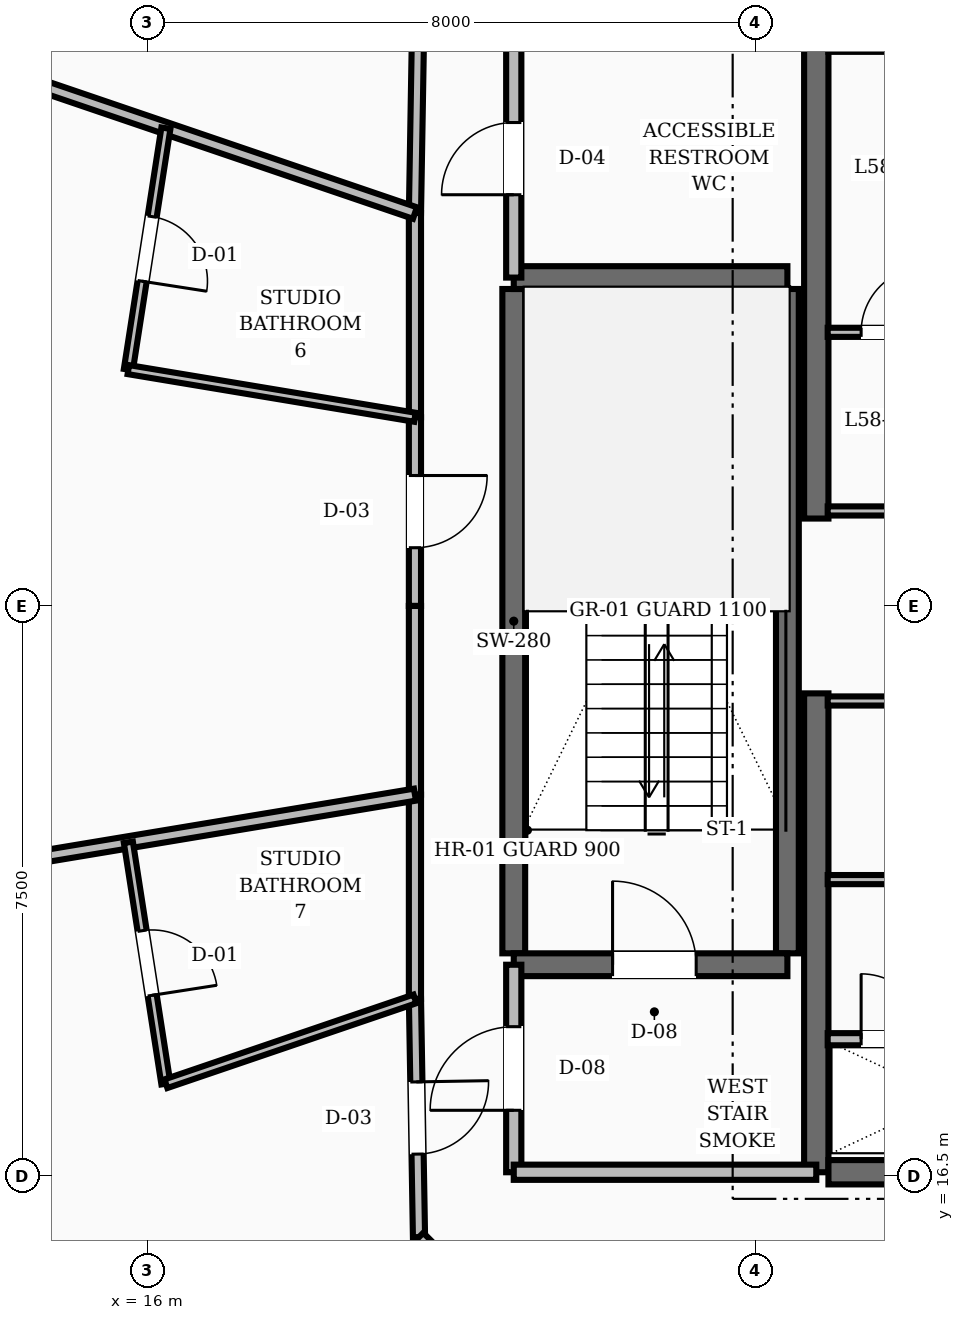
"""IFC4 building model, lengths in metres.
Left out: names, types, materials, properties, quantities, classifications, styles, units other than length and angle.
Written with IfcOpenShell. Run it as: python <this file> out.ifc"""

import sys

from ifc_helpers import new_model, si_unit, direction, frame, frame_2d, origin, place, context, subcontext, project, spatial, rectangle, extrude, element, fill, save


model = new_model("IFC4")
c1 = context("Model", 3, precision=1e-05, world=origin(), true_north=direction((0.0, 1.0)))
c2 = subcontext(c1, "Body", "Model", "MODEL_VIEW")
j1 = project(units=[si_unit("LENGTHUNIT", "METRE"), si_unit("PLANEANGLEUNIT", "RADIAN")], contexts=[c1])
p1 = place(None, origin())
s1 = spatial("IfcSite", under=j1, at=p1, CompositionType="ELEMENT")
p2 = place(p1, origin())
s2 = spatial("IfcBuilding", under=s1, at=p2, CompositionType="ELEMENT")
p3 = place(p2, frame((0.0, 0.0, 225.6)))
s3 = spatial("IfcBuildingStorey", under=s2, at=p3, CompositionType="ELEMENT", Elevation=225.6)
for number, where, z_axis, x_axis in (
    (1, (24.8, 16.55, 0.0), (0.0, 0.0, 1.0), (0.0, 1.0, 0.0)),
    (2, (24.8, 25.15, 0.0), (0.0, 0.0, 1.0), (0.0, 1.0, 0.0)),
):
    element("IfcWall", number, at=place(p3, frame(where, z_axis=z_axis, x_axis=x_axis)), inside=s3, PredefinedType="SHEAR", context=c2, shape_type="SweptSolid", body=[
        extrude(rectangle(XDim=6.3, YDim=0.32, at=frame_2d((3.15, 0.0))), origin(), (0.0, 0.0, 1.0), 3.6),
    ])
p4 = place(p3, frame((24.96, 16.55, 0.0), z_axis=(0.0, 0.0, 1.0), x_axis=(1.0, 0.0, 0.0)))
e3 = element("IfcWall", 3, at=p4, inside=s3, PredefinedType="SHEAR", context=c2, shape_type="SweptSolid", body=[
    extrude(rectangle(XDim=3.24, YDim=0.32, at=frame_2d((1.62, 0.0))), origin(), (0.0, 0.0, 1.0), 3.6),
])
for number, where, z_axis, x_axis in (
    (4, (20.82, 19.43, 0.0), (0.0, 0.0, 1.0), (0.0, 1.0, 0.0)),
    (5, (24.42, 19.43, 0.0), (0.0, 0.0, 1.0), (0.0, 1.0, 0.0)),
):
    element("IfcWall", number, at=place(p3, frame(where, z_axis=z_axis, x_axis=x_axis)), inside=s3, PredefinedType="SHEAR", context=c2, shape_type="SweptSolid", body=[
        extrude(rectangle(XDim=8.74, YDim=0.3, at=frame_2d((4.37, 0.0))), origin(), (0.0, 0.0, 1.0), 3.6),
    ])
p5 = place(p3, frame((20.82, 19.28, 0.0), z_axis=(0.0, 0.0, 1.0), x_axis=(1.0, 0.0, 0.0)))
e6 = element("IfcWall", 6, at=p5, inside=s3, PredefinedType="SHEAR", context=c2, shape_type="SweptSolid", body=[
    extrude(rectangle(XDim=3.6, YDim=0.3, at=frame_2d((1.8, 0.0))), origin(), (0.0, 0.0, 1.0), 3.6),
])
p6 = place(p5, frame((1.3, 0.0, 0.0)))
e7 = element("IfcOpeningElement", 7, at=p6, cuts=e6, PredefinedType="OPENING", context=c2, shape_type="SweptSolid", body=[
    extrude(rectangle(XDim=1.1, YDim=2.1, at=frame_2d((0.55, 1.05))), frame((0.0, 0.16, 0.0), z_axis=(0.0, -1.0, 0.0), x_axis=(1.0, 0.0, 0.0)), (0.0, 0.0, 1.0), 0.32),
])
p7 = place(p3, frame((20.82, 28.32, 0.0), z_axis=(0.0, 0.0, 1.0), x_axis=(1.0, 0.0, 0.0)))
e8 = element("IfcWall", 8, at=p7, inside=s3, PredefinedType="SHEAR", context=c2, shape_type="SweptSolid", body=[
    extrude(rectangle(XDim=3.6, YDim=0.3, at=frame_2d((1.8, 0.0))), origin(), (0.0, 0.0, 1.0), 3.6),
])
p8 = place(p3, frame((20.82, 16.55, 0.0), z_axis=(0.0, 0.0, 1.0), x_axis=(0.0, 1.0, 0.0)))
e9 = element("IfcWall", 9, at=p8, inside=s3, PredefinedType="SOLIDWALL", context=c2, shape_type="SweptSolid", body=[
    extrude(rectangle(XDim=2.73, YDim=0.2, at=frame_2d((1.365, 0.0))), origin(), (0.0, 0.0, 1.0), 2.87),
])
p9 = place(p8, frame((0.815, 0.0, 0.0)))
e10 = element("IfcOpeningElement", 10, at=p9, cuts=e9, PredefinedType="OPENING", context=c2, shape_type="SweptSolid", body=[
    extrude(rectangle(XDim=1.1, YDim=2.1, at=frame_2d((0.55, 1.05))), frame((0.0, 0.11, 0.0), z_axis=(0.0, -1.0, 0.0), x_axis=(1.0, 0.0, 0.0)), (0.0, 0.0, 1.0), 0.22),
])
p10 = place(p3, frame((20.82, 16.55, 0.0), z_axis=(0.0, 0.0, 1.0), x_axis=(1.0, 0.0, 0.0)))
e11 = element("IfcWall", 11, at=p10, inside=s3, PredefinedType="SOLIDWALL", context=c2, shape_type="SweptSolid", body=[
    extrude(rectangle(XDim=3.98, YDim=0.2, at=frame_2d((1.99, 0.0))), origin(), (0.0, 0.0, 1.0), 2.87),
])
p11 = place(p3, frame((20.82, 28.32, 0.0), z_axis=(0.0, 0.0, 1.0), x_axis=(0.0, 1.0, 0.0)))
e12 = element("IfcWall", 12, at=p11, inside=s3, PredefinedType="SOLIDWALL", context=c2, shape_type="SweptSolid", body=[
    extrude(rectangle(XDim=3.13, YDim=0.2, at=frame_2d((1.565, 0.0))), origin(), (0.0, 0.0, 1.0), 2.87),
])
p12 = place(p11, frame((1.09, 0.0, 0.0)))
e13 = element("IfcOpeningElement", 13, at=p12, cuts=e12, PredefinedType="OPENING", context=c2, shape_type="SweptSolid", body=[
    extrude(rectangle(XDim=0.95, YDim=2.1, at=frame_2d((0.475, 1.05))), frame((0.0, 0.11, 0.0), z_axis=(0.0, -1.0, 0.0), x_axis=(1.0, 0.0, 0.0)), (0.0, 0.0, 1.0), 0.22),
])
p13 = place(p3, frame((24.95, 18.3, 0.0), z_axis=(0.0, 0.0, 1.0), x_axis=(1.0, 0.0, 0.0)))
e14 = element("IfcWall", 14, at=p13, inside=s3, PredefinedType="SOLIDWALL", context=c2, shape_type="SweptSolid", body=[
    extrude(rectangle(XDim=3.2, YDim=0.16, at=frame_2d((1.6, 0.0))), origin(), (0.0, 0.0, 1.0), 2.87),
])
p14 = place(p13, frame((0.44, 0.0, 0.0)))
e15 = element("IfcOpeningElement", 15, at=p14, cuts=e14, PredefinedType="OPENING", context=c2, shape_type="SweptSolid", body=[
    extrude(rectangle(XDim=0.86, YDim=2.05, at=frame_2d((0.43, 1.025))), frame((0.0, 0.09, 0.0), z_axis=(0.0, -1.0, 0.0), x_axis=(1.0, 0.0, 0.0)), (0.0, 0.0, 1.0), 0.18),
])
p15 = place(p3, frame((24.95, 25.25, 0.0), z_axis=(0.0, 0.0, 1.0), x_axis=(1.0, 0.0, 0.0)))
e16 = element("IfcWall", 16, at=p15, inside=s3, PredefinedType="PARTITIONING", context=c2, shape_type="SweptSolid", body=[
    extrude(rectangle(XDim=3.2, YDim=0.12, at=frame_2d((1.6, 0.0))), origin(), (0.0, 0.0, 1.0), 2.87),
])
p16 = place(p15, frame((1.125, 0.0, 0.0)))
e17 = element("IfcOpeningElement", 17, at=p16, cuts=e16, PredefinedType="OPENING", context=c2, shape_type="SweptSolid", body=[
    extrude(rectangle(XDim=0.95, YDim=2.1, at=frame_2d((0.475, 1.05))), frame((0.0, 0.07, 0.0), z_axis=(0.0, -1.0, 0.0), x_axis=(1.0, 0.0, 0.0)), (0.0, 0.0, 1.0), 0.14),
])
p17 = place(p3, frame((24.95, 22.75, 0.0), z_axis=(0.0, 0.0, 1.0), x_axis=(1.0, 0.0, 0.0)))
e18 = element("IfcWall", 18, at=p17, inside=s3, PredefinedType="PARTITIONING", context=c2, shape_type="SweptSolid", body=[
    extrude(rectangle(XDim=3.2, YDim=0.12, at=frame_2d((1.6, 0.0))), origin(), (0.0, 0.0, 1.0), 2.87),
])
p18 = place(p17, frame((1.125, 0.0, 0.0)))
e19 = element("IfcOpeningElement", 19, at=p18, cuts=e18, PredefinedType="OPENING", context=c2, shape_type="SweptSolid", body=[
    extrude(rectangle(XDim=0.95, YDim=2.1, at=frame_2d((0.475, 1.05))), frame((0.0, 0.07, 0.0), z_axis=(0.0, -1.0, 0.0), x_axis=(1.0, 0.0, 0.0)), (0.0, 0.0, 1.0), 0.14),
])
p19 = place(p3, frame((24.95, 27.6, 0.0), z_axis=(0.0, 0.0, 1.0), x_axis=(1.0, 0.0, 0.0)))
e20 = element("IfcWall", 20, at=p19, inside=s3, PredefinedType="PARTITIONING", context=c2, shape_type="SweptSolid", body=[
    extrude(rectangle(XDim=3.2, YDim=0.12, at=frame_2d((1.6, 0.0))), origin(), (0.0, 0.0, 1.0), 2.87),
])
p20 = place(p19, frame((0.44, 0.0, 0.0)))
e21 = element("IfcOpeningElement", 21, at=p20, cuts=e20, PredefinedType="OPENING", context=c2, shape_type="SweptSolid", body=[
    extrude(rectangle(XDim=0.86, YDim=2.1, at=frame_2d((0.43, 1.05))), frame((0.0, 0.07, 0.0), z_axis=(0.0, -1.0, 0.0), x_axis=(1.0, 0.0, 0.0)), (0.0, 0.0, 1.0), 0.14),
])
p21 = place(p19, frame((1.9, 0.0, 0.0)))
e22 = element("IfcOpeningElement", 22, at=p21, cuts=e20, PredefinedType="OPENING", context=c2, shape_type="SweptSolid", body=[
    extrude(rectangle(XDim=0.86, YDim=2.1, at=frame_2d((0.43, 1.05))), frame((0.0, 0.07, 0.0), z_axis=(0.0, -1.0, 0.0), x_axis=(1.0, 0.0, 0.0)), (0.0, 0.0, 1.0), 0.14),
])
p22 = place(p3, frame((24.95, 20.4, 0.0), z_axis=(0.0, 0.0, 1.0), x_axis=(1.0, 0.0, 0.0)))
e23 = element("IfcWall", 23, at=p22, inside=s3, PredefinedType="PARTITIONING", context=c2, shape_type="SweptSolid", body=[
    extrude(rectangle(XDim=3.2, YDim=0.12, at=frame_2d((1.6, 0.0))), origin(), (0.0, 0.0, 1.0), 2.87),
])
p23 = place(p22, frame((1.125, 0.0, 0.0)))
e24 = element("IfcOpeningElement", 24, at=p23, cuts=e23, PredefinedType="OPENING", context=c2, shape_type="SweptSolid", body=[
    extrude(rectangle(XDim=0.95, YDim=2.1, at=frame_2d((0.475, 1.05))), frame((0.0, 0.07, 0.0), z_axis=(0.0, -1.0, 0.0), x_axis=(1.0, 0.0, 0.0)), (0.0, 0.0, 1.0), 0.14),
])
p24 = place(p3, frame((19.573, 32.303, 0.0), z_axis=(0.0, 0.0, 1.0), x_axis=(-0.016981035134, -0.999855811828, 0.0)))
e25 = element("IfcWall", 25, at=p24, inside=s3, PredefinedType="SOLIDWALL", context=c2, shape_type="SweptSolid", body=[
    extrude(rectangle(XDim=3.134, YDim=0.16, at=frame_2d((1.567, 0.0))), origin(), (0.0, 0.0, 1.0), 2.87),
])
p25 = place(p3, frame((19.52, 29.169, 0.0), z_axis=(0.0, 0.0, 1.0), x_axis=(0.0, -1.0, 0.0)))
e26 = element("IfcWall", 26, at=p25, inside=s3, PredefinedType="SOLIDWALL", context=c2, shape_type="SweptSolid", body=[
    extrude(rectangle(XDim=2.687, YDim=0.16, at=frame_2d((1.344, 0.0))), origin(), (0.0, 0.0, 1.0), 2.87),
])
p26 = place(p3, frame((19.52, 26.482, 0.0), z_axis=(0.0, 0.0, 1.0), x_axis=(0.0, -1.0, 0.0)))
e27 = element("IfcWall", 27, at=p26, inside=s3, PredefinedType="SOLIDWALL", context=c2, shape_type="SweptSolid", body=[
    extrude(rectangle(XDim=2.482, YDim=0.16, at=frame_2d((1.241, 0.0))), origin(), (0.0, 0.0, 1.0), 2.87),
])
p27 = place(p26, frame((0.766, 0.0, 0.0)))
e28 = element("IfcOpeningElement", 28, at=p27, cuts=e27, PredefinedType="OPENING", context=c2, shape_type="SweptSolid", body=[
    extrude(rectangle(XDim=0.95, YDim=2.1, at=frame_2d((0.475, 1.05))), frame((0.0, 0.09, 0.0), z_axis=(0.0, -1.0, 0.0), x_axis=(1.0, 0.0, 0.0)), (0.0, 0.0, 1.0), 0.18),
])
p28 = place(p3, frame((19.52, 24.0, 0.0), z_axis=(0.0, 0.0, 1.0), x_axis=(0.0, -1.0, 0.0)))
e29 = element("IfcWall", 29, at=p28, inside=s3, PredefinedType="SOLIDWALL", context=c2, shape_type="SweptSolid", body=[
    extrude(rectangle(XDim=2.482, YDim=0.16, at=frame_2d((1.241, 0.0))), origin(), (0.0, 0.0, 1.0), 2.87),
])
p29 = place(p3, frame((19.52, 21.518, 0.0), z_axis=(0.0, 0.0, 1.0), x_axis=(0.0, -1.0, 0.0)))
e30 = element("IfcWall", 30, at=p29, inside=s3, PredefinedType="SOLIDWALL", context=c2, shape_type="SweptSolid", body=[
    extrude(rectangle(XDim=2.687, YDim=0.16, at=frame_2d((1.344, 0.0))), origin(), (0.0, 0.0, 1.0), 2.87),
])
p30 = place(p3, frame((19.52, 18.831, 0.0), z_axis=(0.0, 0.0, 1.0), x_axis=(0.016981035134, -0.999855811828, 0.0)))
e31 = element("IfcWall", 31, at=p30, inside=s3, PredefinedType="SOLIDWALL", context=c2, shape_type="SweptSolid", body=[
    extrude(rectangle(XDim=3.134, YDim=0.16, at=frame_2d((1.567, 0.0))), origin(), (0.0, 0.0, 1.0), 2.87),
])
p31 = place(p30, frame((1.092, 0.0, 0.0)))
e32 = element("IfcOpeningElement", 32, at=p31, cuts=e31, PredefinedType="OPENING", context=c2, shape_type="SweptSolid", body=[
    extrude(rectangle(XDim=0.95, YDim=2.1, at=frame_2d((0.475, 1.05))), frame((0.0, 0.09, 0.0), z_axis=(0.0, -1.0, 0.0), x_axis=(1.0, 0.0, 0.0)), (0.0, 0.0, 1.0), 0.18),
])
p32 = place(p3, frame((19.573, 15.697, 0.0), z_axis=(0.0, 0.0, 1.0), x_axis=(0.707106781187, -0.707106781187, 0.0)))
e33 = element("IfcWall", 33, at=p32, inside=s3, PredefinedType="SOLIDWALL", context=c2, shape_type="SweptSolid", body=[
    extrude(rectangle(XDim=2.916, YDim=0.16, at=frame_2d((1.458, 0.0))), origin(), (0.0, 0.0, 1.0), 2.87),
])
p33 = place(p3, frame((19.52, 29.169, 0.0), z_axis=(0.0, 0.0, 1.0), x_axis=(-0.946595836361, 0.322422583862, 0.0)))
e34 = element("IfcWall", 34, at=p33, inside=s3, PredefinedType="SOLIDWALL", context=c2, shape_type="SweptSolid", body=[
    extrude(rectangle(XDim=9.058, YDim=0.16, at=frame_2d((4.529, 0.0))), origin(), (0.0, 0.0, 1.0), 2.87),
])
p34 = place(p3, frame((16.244, 30.285, 0.0), z_axis=(0.0, 0.0, 1.0), x_axis=(-0.153660860634, -0.988123646063, 0.0)))
e35 = element("IfcWall", 35, at=p34, inside=s3, PredefinedType="PARTITIONING", context=c2, shape_type="SweptSolid", body=[
    extrude(rectangle(XDim=3.214, YDim=0.12, at=frame_2d((1.607, 0.0))), origin(), (0.0, 0.0, 1.0), 2.87),
])
p35 = place(p34, frame((1.177, 0.0, 0.0)))
e36 = element("IfcOpeningElement", 36, at=p35, cuts=e35, PredefinedType="OPENING", context=c2, shape_type="SweptSolid", body=[
    extrude(rectangle(XDim=0.86, YDim=2.1, at=frame_2d((0.43, 1.05))), frame((0.0, 0.07, 0.0), z_axis=(0.0, -1.0, 0.0), x_axis=(1.0, 0.0, 0.0)), (0.0, 0.0, 1.0), 0.14),
])
p36 = place(p3, frame((19.52, 26.482, 0.0), z_axis=(0.0, 0.0, 1.0), x_axis=(-0.986454281504, 0.164036430415, 0.0)))
e37 = element("IfcWall", 37, at=p36, inside=s3, PredefinedType="PARTITIONING", context=c2, shape_type="SweptSolid", body=[
    extrude(rectangle(XDim=3.822, YDim=0.12, at=frame_2d((1.911, 0.0))), origin(), (0.0, 0.0, 1.0), 2.87),
])
p37 = place(p3, frame((19.52, 21.518, 0.0), z_axis=(0.0, 0.0, 1.0), x_axis=(-0.986451224461, -0.164054813277, 0.0)))
e38 = element("IfcWall", 38, at=p37, inside=s3, PredefinedType="SOLIDWALL", context=c2, shape_type="SweptSolid", body=[
    extrude(rectangle(XDim=10.008, YDim=0.16, at=frame_2d((5.004, 0.0))), origin(), (0.0, 0.0, 1.0), 2.87),
])
p38 = place(p3, frame((15.75, 20.891, 0.0), z_axis=(0.0, 0.0, 1.0), x_axis=(0.153660860634, -0.988123646063, 0.0)))
e39 = element("IfcWall", 39, at=p38, inside=s3, PredefinedType="PARTITIONING", context=c2, shape_type="SweptSolid", body=[
    extrude(rectangle(XDim=3.214, YDim=0.12, at=frame_2d((1.607, 0.0))), origin(), (0.0, 0.0, 1.0), 2.87),
])
p39 = place(p38, frame((1.177, 0.0, 0.0)))
e40 = element("IfcOpeningElement", 40, at=p39, cuts=e39, PredefinedType="OPENING", context=c2, shape_type="SweptSolid", body=[
    extrude(rectangle(XDim=0.86, YDim=2.1, at=frame_2d((0.43, 1.05))), frame((0.0, 0.07, 0.0), z_axis=(0.0, -1.0, 0.0), x_axis=(1.0, 0.0, 0.0)), (0.0, 0.0, 1.0), 0.14),
])
p40 = place(p3, frame((19.52, 18.831, 0.0), z_axis=(0.0, 0.0, 1.0), x_axis=(-0.946596325492, -0.322421147826, 0.0)))
e41 = element("IfcWall", 41, at=p40, inside=s3, PredefinedType="PARTITIONING", context=c2, shape_type="SweptSolid", body=[
    extrude(rectangle(XDim=3.461, YDim=0.12, at=frame_2d((1.73, 0.0))), origin(), (0.0, 0.0, 1.0), 2.87),
])
p41 = place(p6, origin())
e42 = element("IfcDoor", 42, at=p41, inside=s3, OperationType="SINGLE_SWING_LEFT", PredefinedType="DOOR", context=c2, shape_type="SweptSolid", body=[
    extrude(rectangle(XDim=1.1, YDim=2.1, at=frame_2d((0.55, 1.05))), frame((0.0, 0.025, 0.0), z_axis=(0.0, -1.0, 0.0), x_axis=(1.0, 0.0, 0.0)), (0.0, 0.0, 1.0), 0.05),
])
fill(e7, e42)
p42 = place(p9, origin())
e43 = element("IfcDoor", 43, at=p42, inside=s3, OperationType="SINGLE_SWING_LEFT", PredefinedType="DOOR", context=c2, shape_type="SweptSolid", body=[
    extrude(rectangle(XDim=1.1, YDim=2.1, at=frame_2d((0.55, 1.05))), frame((0.0, 0.025, 0.0), z_axis=(0.0, -1.0, 0.0), x_axis=(1.0, 0.0, 0.0)), (0.0, 0.0, 1.0), 0.05),
])
fill(e10, e43)
p43 = place(p12, origin())
e44 = element("IfcDoor", 44, at=p43, inside=s3, OperationType="SINGLE_SWING_LEFT", PredefinedType="DOOR", context=c2, shape_type="SweptSolid", body=[
    extrude(rectangle(XDim=0.95, YDim=2.1, at=frame_2d((0.475, 1.05))), frame((0.0, 0.025, 0.0), z_axis=(0.0, -1.0, 0.0), x_axis=(1.0, 0.0, 0.0)), (0.0, 0.0, 1.0), 0.05),
])
fill(e13, e44)
p44 = place(p14, origin())
e45 = element("IfcDoor", 45, at=p44, inside=s3, OperationType="SINGLE_SWING_LEFT", PredefinedType="TRAPDOOR", context=c2, shape_type="SweptSolid", body=[
    extrude(rectangle(XDim=0.86, YDim=2.05, at=frame_2d((0.43, 1.025))), frame((0.0, 0.025, 0.0), z_axis=(0.0, -1.0, 0.0), x_axis=(1.0, 0.0, 0.0)), (0.0, 0.0, 1.0), 0.05),
])
fill(e15, e45)
p45 = place(p20, origin())
e46 = element("IfcDoor", 46, at=p45, inside=s3, OperationType="SINGLE_SWING_RIGHT", PredefinedType="DOOR", context=c2, shape_type="SweptSolid", body=[
    extrude(rectangle(XDim=0.86, YDim=2.1, at=frame_2d((0.43, 1.05))), frame((0.0, 0.025, 0.0), z_axis=(0.0, -1.0, 0.0), x_axis=(1.0, 0.0, 0.0)), (0.0, 0.0, 1.0), 0.05),
])
fill(e21, e46)
p46 = place(p35, origin())
e47 = element("IfcDoor", 47, at=p46, inside=s3, OperationType="SINGLE_SWING_RIGHT", PredefinedType="DOOR", context=c2, shape_type="SweptSolid", body=[
    extrude(rectangle(XDim=0.86, YDim=2.1, at=frame_2d((0.43, 1.05))), frame((0.0, 0.025, 0.0), z_axis=(0.0, -1.0, 0.0), x_axis=(1.0, 0.0, 0.0)), (0.0, 0.0, 1.0), 0.05),
])
fill(e36, e47)
p47 = place(p27, origin())
e48 = element("IfcDoor", 48, at=p47, inside=s3, OperationType="SINGLE_SWING_LEFT", PredefinedType="DOOR", context=c2, shape_type="SweptSolid", body=[
    extrude(rectangle(XDim=0.95, YDim=2.1, at=frame_2d((0.475, 1.05))), frame((0.0, 0.025, 0.0), z_axis=(0.0, -1.0, 0.0), x_axis=(1.0, 0.0, 0.0)), (0.0, 0.0, 1.0), 0.05),
])
fill(e28, e48)
p48 = place(p39, origin())
e49 = element("IfcDoor", 49, at=p48, inside=s3, OperationType="SINGLE_SWING_RIGHT", PredefinedType="DOOR", context=c2, shape_type="SweptSolid", body=[
    extrude(rectangle(XDim=0.86, YDim=2.1, at=frame_2d((0.43, 1.05))), frame((0.0, 0.025, 0.0), z_axis=(0.0, -1.0, 0.0), x_axis=(1.0, 0.0, 0.0)), (0.0, 0.0, 1.0), 0.05),
])
fill(e40, e49)
p49 = place(p31, origin())
e50 = element("IfcDoor", 50, at=p49, inside=s3, OperationType="SINGLE_SWING_LEFT", PredefinedType="DOOR", context=c2, shape_type="SweptSolid", body=[
    extrude(rectangle(XDim=0.95, YDim=2.1, at=frame_2d((0.475, 1.05))), frame((0.0, 0.025, 0.0), z_axis=(0.0, -1.0, 0.0), x_axis=(1.0, 0.0, 0.0)), (0.0, 0.0, 1.0), 0.05),
])
fill(e32, e50)
save(model, sys.argv[1])
